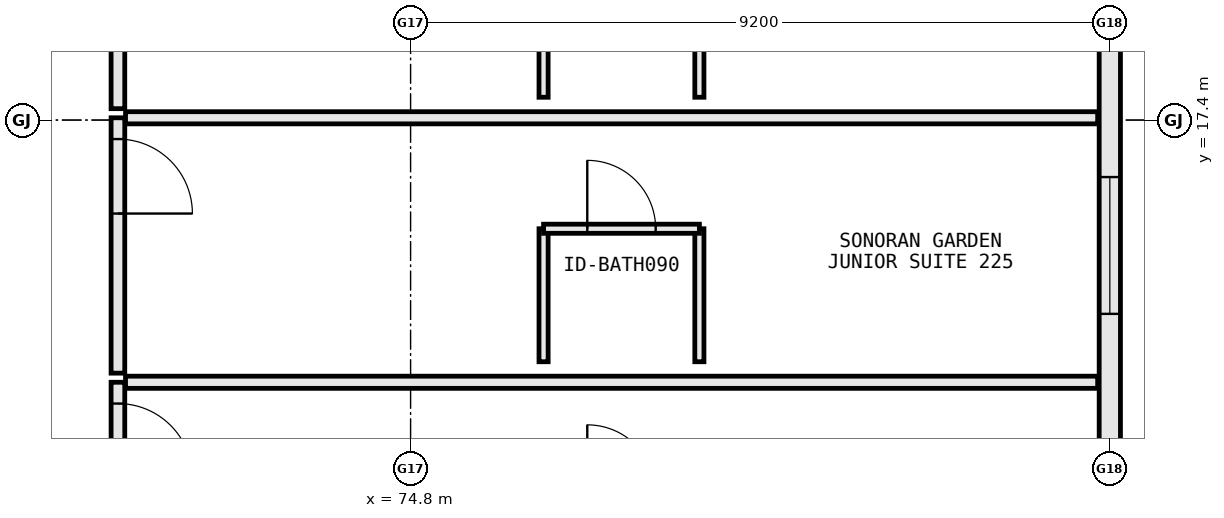
"""IFC4 building model, lengths in metres.
Left out: names, types, materials, properties, quantities, classifications, styles, units other than length and angle.
Written with IfcOpenShell. Run it as: python <this file> out.ifc"""

import sys

from ifc_helpers import new_model, si_unit, direction, frame, frame_2d, origin, place, context, subcontext, project, spatial, rectangle, extrude, element, fill, save


model = new_model("IFC4")
c1 = context("Model", 3, precision=1e-05, world=origin(), true_north=direction((0.0, 1.0)))
c2 = subcontext(c1, "Body", "Model", "MODEL_VIEW")
j1 = project(units=[si_unit("LENGTHUNIT", "METRE"), si_unit("PLANEANGLEUNIT", "RADIAN")], contexts=[c1])
p1 = place(None, origin())
s1 = spatial("IfcSite", under=j1, at=p1, CompositionType="ELEMENT")
p2 = place(p1, origin())
s2 = spatial("IfcBuilding", under=s1, at=p2, CompositionType="ELEMENT")
p3 = place(p2, frame((0.0, 0.0, 31.4)))
s3 = spatial("IfcBuildingStorey", under=s2, at=p3, CompositionType="ELEMENT", Elevation=31.4)
p4 = place(p3, frame((84.0, 10.423, 0.0), z_axis=(0.0, 0.0, 1.0), x_axis=(0.0, 1.0, 0.0)))
e1 = element("IfcWall", 1, at=p4, inside=s3, PredefinedType="STANDARD", context=c2, shape_type="SweptSolid", body=[
    extrude(rectangle(XDim=7.954, YDim=0.28, at=frame_2d((3.977, 0.0))), origin(), (0.0, 0.0, 1.0), 2.97),
])
p5 = place(p4, frame((0.947, 0.0, 0.85)))
e2 = element("IfcOpeningElement", 2, at=p5, cuts=e1, PredefinedType="OPENING", context=c2, shape_type="SweptSolid", body=[
    extrude(rectangle(XDim=1.8, YDim=1.85, at=frame_2d((0.9, 0.925))), frame((0.0, 0.152, 0.0), z_axis=(0.0, -1.0, 0.0), x_axis=(1.0, 0.0, 0.0)), (0.0, 0.0, 1.0), 0.304),
])
p6 = place(p4, frame((4.427, 0.0, 0.85)))
e3 = element("IfcOpeningElement", 3, at=p6, cuts=e1, PredefinedType="OPENING", context=c2, shape_type="SweptSolid", body=[
    extrude(rectangle(XDim=1.8, YDim=1.85, at=frame_2d((0.9, 0.925))), frame((0.0, 0.152, 0.0), z_axis=(0.0, -1.0, 0.0), x_axis=(1.0, 0.0, 0.0)), (0.0, 0.0, 1.0), 0.304),
])
p7 = place(p3, frame((70.95, 13.95, 0.0), z_axis=(0.0, 0.0, 1.0), x_axis=(0.0, -1.0, 0.0)))
e4 = element("IfcWall", 4, at=p7, inside=s3, PredefinedType="PARTITIONING", context=c2, shape_type="SweptSolid", body=[
    extrude(rectangle(XDim=3.36, YDim=0.18, at=frame_2d((1.68, 0.0))), origin(), (0.0, 0.0, 1.0), 3.555),
])
p8 = place(p7, frame((0.28, 0.0, 0.0)))
e5 = element("IfcOpeningElement", 5, at=p8, cuts=e4, PredefinedType="OPENING", context=c2, shape_type="SweptSolid", body=[
    extrude(rectangle(XDim=0.98, YDim=2.18, at=frame_2d((0.49, 1.09))), frame((0.0, 0.102, 0.0), z_axis=(0.0, -1.0, 0.0), x_axis=(1.0, 0.0, 0.0)), (0.0, 0.0, 1.0), 0.204),
])
p9 = place(p3, frame((71.05, 13.95, 0.0), z_axis=(0.0, 0.0, 1.0), x_axis=(1.0, 0.0, 0.0)))
e6 = element("IfcWall", 6, at=p9, inside=s3, PredefinedType="PARTITIONING", context=c2, shape_type="SweptSolid", body=[
    extrude(rectangle(XDim=12.79, YDim=0.16, at=frame_2d((6.395, 0.0))), origin(), (0.0, 0.0, 1.0), 3.555),
])
p10 = place(p3, frame((70.95, 17.43, 0.0), z_axis=(0.0, 0.0, 1.0), x_axis=(0.0, -1.0, 0.0)))
e7 = element("IfcWall", 7, at=p10, inside=s3, PredefinedType="PARTITIONING", context=c2, shape_type="SweptSolid", body=[
    extrude(rectangle(XDim=3.36, YDim=0.18, at=frame_2d((1.68, 0.0))), origin(), (0.0, 0.0, 1.0), 3.555),
])
p11 = place(p10, frame((0.28, 0.0, 0.0)))
e8 = element("IfcOpeningElement", 8, at=p11, cuts=e7, PredefinedType="OPENING", context=c2, shape_type="SweptSolid", body=[
    extrude(rectangle(XDim=0.98, YDim=2.18, at=frame_2d((0.49, 1.09))), frame((0.0, 0.102, 0.0), z_axis=(0.0, -1.0, 0.0), x_axis=(1.0, 0.0, 0.0)), (0.0, 0.0, 1.0), 0.204),
])
p12 = place(p3, frame((71.05, 17.43, 0.0), z_axis=(0.0, 0.0, 1.0), x_axis=(1.0, 0.0, 0.0)))
e9 = element("IfcWall", 9, at=p12, inside=s3, PredefinedType="PARTITIONING", context=c2, shape_type="SweptSolid", body=[
    extrude(rectangle(XDim=12.79, YDim=0.16, at=frame_2d((6.395, 0.0))), origin(), (0.0, 0.0, 1.0), 3.555),
])
for number, where, z_axis, x_axis in (
    (10, (76.55, 14.22, 0.0), (0.0, 0.0, 1.0), (0.0, 1.0, 0.0)),
    (11, (78.6, 14.22, 0.0), (0.0, 0.0, 1.0), (0.0, 1.0, 0.0)),
):
    element("IfcWall", number, at=place(p3, frame(where, z_axis=z_axis, x_axis=x_axis)), inside=s3, PredefinedType="PARTITIONING", context=c2, shape_type="SweptSolid", body=[
        extrude(rectangle(XDim=1.75, YDim=0.12, at=frame_2d((0.875, 0.0))), origin(), (0.0, 0.0, 1.0), 3.555),
    ])
p13 = place(p3, frame((76.55, 15.97, 0.0), z_axis=(0.0, 0.0, 1.0), x_axis=(1.0, 0.0, 0.0)))
e12 = element("IfcWall", 12, at=p13, inside=s3, PredefinedType="PARTITIONING", context=c2, shape_type="SweptSolid", body=[
    extrude(rectangle(XDim=2.05, YDim=0.12, at=frame_2d((1.025, 0.0))), origin(), (0.0, 0.0, 1.0), 3.555),
])
p14 = place(p13, frame((0.575, 0.0, 0.0)))
e13 = element("IfcOpeningElement", 13, at=p14, cuts=e12, PredefinedType="OPENING", context=c2, shape_type="SweptSolid", body=[
    extrude(rectangle(XDim=0.9, YDim=2.15, at=frame_2d((0.45, 1.075))), frame((0.0, 0.072, 0.0), z_axis=(0.0, -1.0, 0.0), x_axis=(1.0, 0.0, 0.0)), (0.0, 0.0, 1.0), 0.144),
])
p15 = place(p3, frame((70.95, 20.91, 0.0), z_axis=(0.0, 0.0, 1.0), x_axis=(0.0, -1.0, 0.0)))
e14 = element("IfcWall", 14, at=p15, inside=s3, PredefinedType="PARTITIONING", context=c2, shape_type="SweptSolid", body=[
    extrude(rectangle(XDim=3.36, YDim=0.18, at=frame_2d((1.68, 0.0))), origin(), (0.0, 0.0, 1.0), 3.555),
])
p16 = place(p15, frame((0.28, 0.0, 0.0)))
e15 = element("IfcOpeningElement", 15, at=p16, cuts=e14, PredefinedType="OPENING", context=c2, shape_type="SweptSolid", body=[
    extrude(rectangle(XDim=0.98, YDim=2.18, at=frame_2d((0.49, 1.09))), frame((0.0, 0.102, 0.0), z_axis=(0.0, -1.0, 0.0), x_axis=(1.0, 0.0, 0.0)), (0.0, 0.0, 1.0), 0.204),
])
for number, where, z_axis, x_axis in (
    (16, (76.55, 17.7, 0.0), (0.0, 0.0, 1.0), (0.0, 1.0, 0.0)),
    (17, (78.6, 17.7, 0.0), (0.0, 0.0, 1.0), (0.0, 1.0, 0.0)),
):
    element("IfcWall", number, at=place(p3, frame(where, z_axis=z_axis, x_axis=x_axis)), inside=s3, PredefinedType="PARTITIONING", context=c2, shape_type="SweptSolid", body=[
        extrude(rectangle(XDim=1.75, YDim=0.12, at=frame_2d((0.875, 0.0))), origin(), (0.0, 0.0, 1.0), 3.555),
    ])
p17 = place(p6, origin())
e18 = element("IfcWindow", 18, at=p17, inside=s3, PartitioningType="SINGLE_PANEL", PredefinedType="WINDOW", context=c2, shape_type="SweptSolid", body=[
    extrude(rectangle(XDim=1.8, YDim=1.85, at=frame_2d((0.9, 0.925))), frame((0.0, 0.03, 0.0), z_axis=(0.0, -1.0, 0.0), x_axis=(1.0, 0.0, 0.0)), (0.0, 0.0, 1.0), 0.06),
])
fill(e3, e18)
p18 = place(p8, origin())
e19 = element("IfcDoor", 19, at=p18, inside=s3, OperationType="SINGLE_SWING_RIGHT", PredefinedType="DOOR", context=c2, shape_type="SweptSolid", body=[
    extrude(rectangle(XDim=0.98, YDim=2.18, at=frame_2d((0.49, 1.09))), frame((0.0, 0.025, 0.0), z_axis=(0.0, -1.0, 0.0), x_axis=(1.0, 0.0, 0.0)), (0.0, 0.0, 1.0), 0.05),
])
fill(e5, e19)
p19 = place(p11, origin())
e20 = element("IfcDoor", 20, at=p19, inside=s3, OperationType="SINGLE_SWING_RIGHT", PredefinedType="DOOR", context=c2, shape_type="SweptSolid", body=[
    extrude(rectangle(XDim=0.98, YDim=2.18, at=frame_2d((0.49, 1.09))), frame((0.0, 0.025, 0.0), z_axis=(0.0, -1.0, 0.0), x_axis=(1.0, 0.0, 0.0)), (0.0, 0.0, 1.0), 0.05),
])
fill(e8, e20)
p20 = place(p14, origin())
e21 = element("IfcDoor", 21, at=p20, inside=s3, OperationType="SINGLE_SWING_LEFT", PredefinedType="DOOR", context=c2, shape_type="SweptSolid", body=[
    extrude(rectangle(XDim=0.9, YDim=2.15, at=frame_2d((0.45, 1.075))), frame((0.0, 0.025, 0.0), z_axis=(0.0, -1.0, 0.0), x_axis=(1.0, 0.0, 0.0)), (0.0, 0.0, 1.0), 0.05),
])
fill(e13, e21)
save(model, sys.argv[1])
